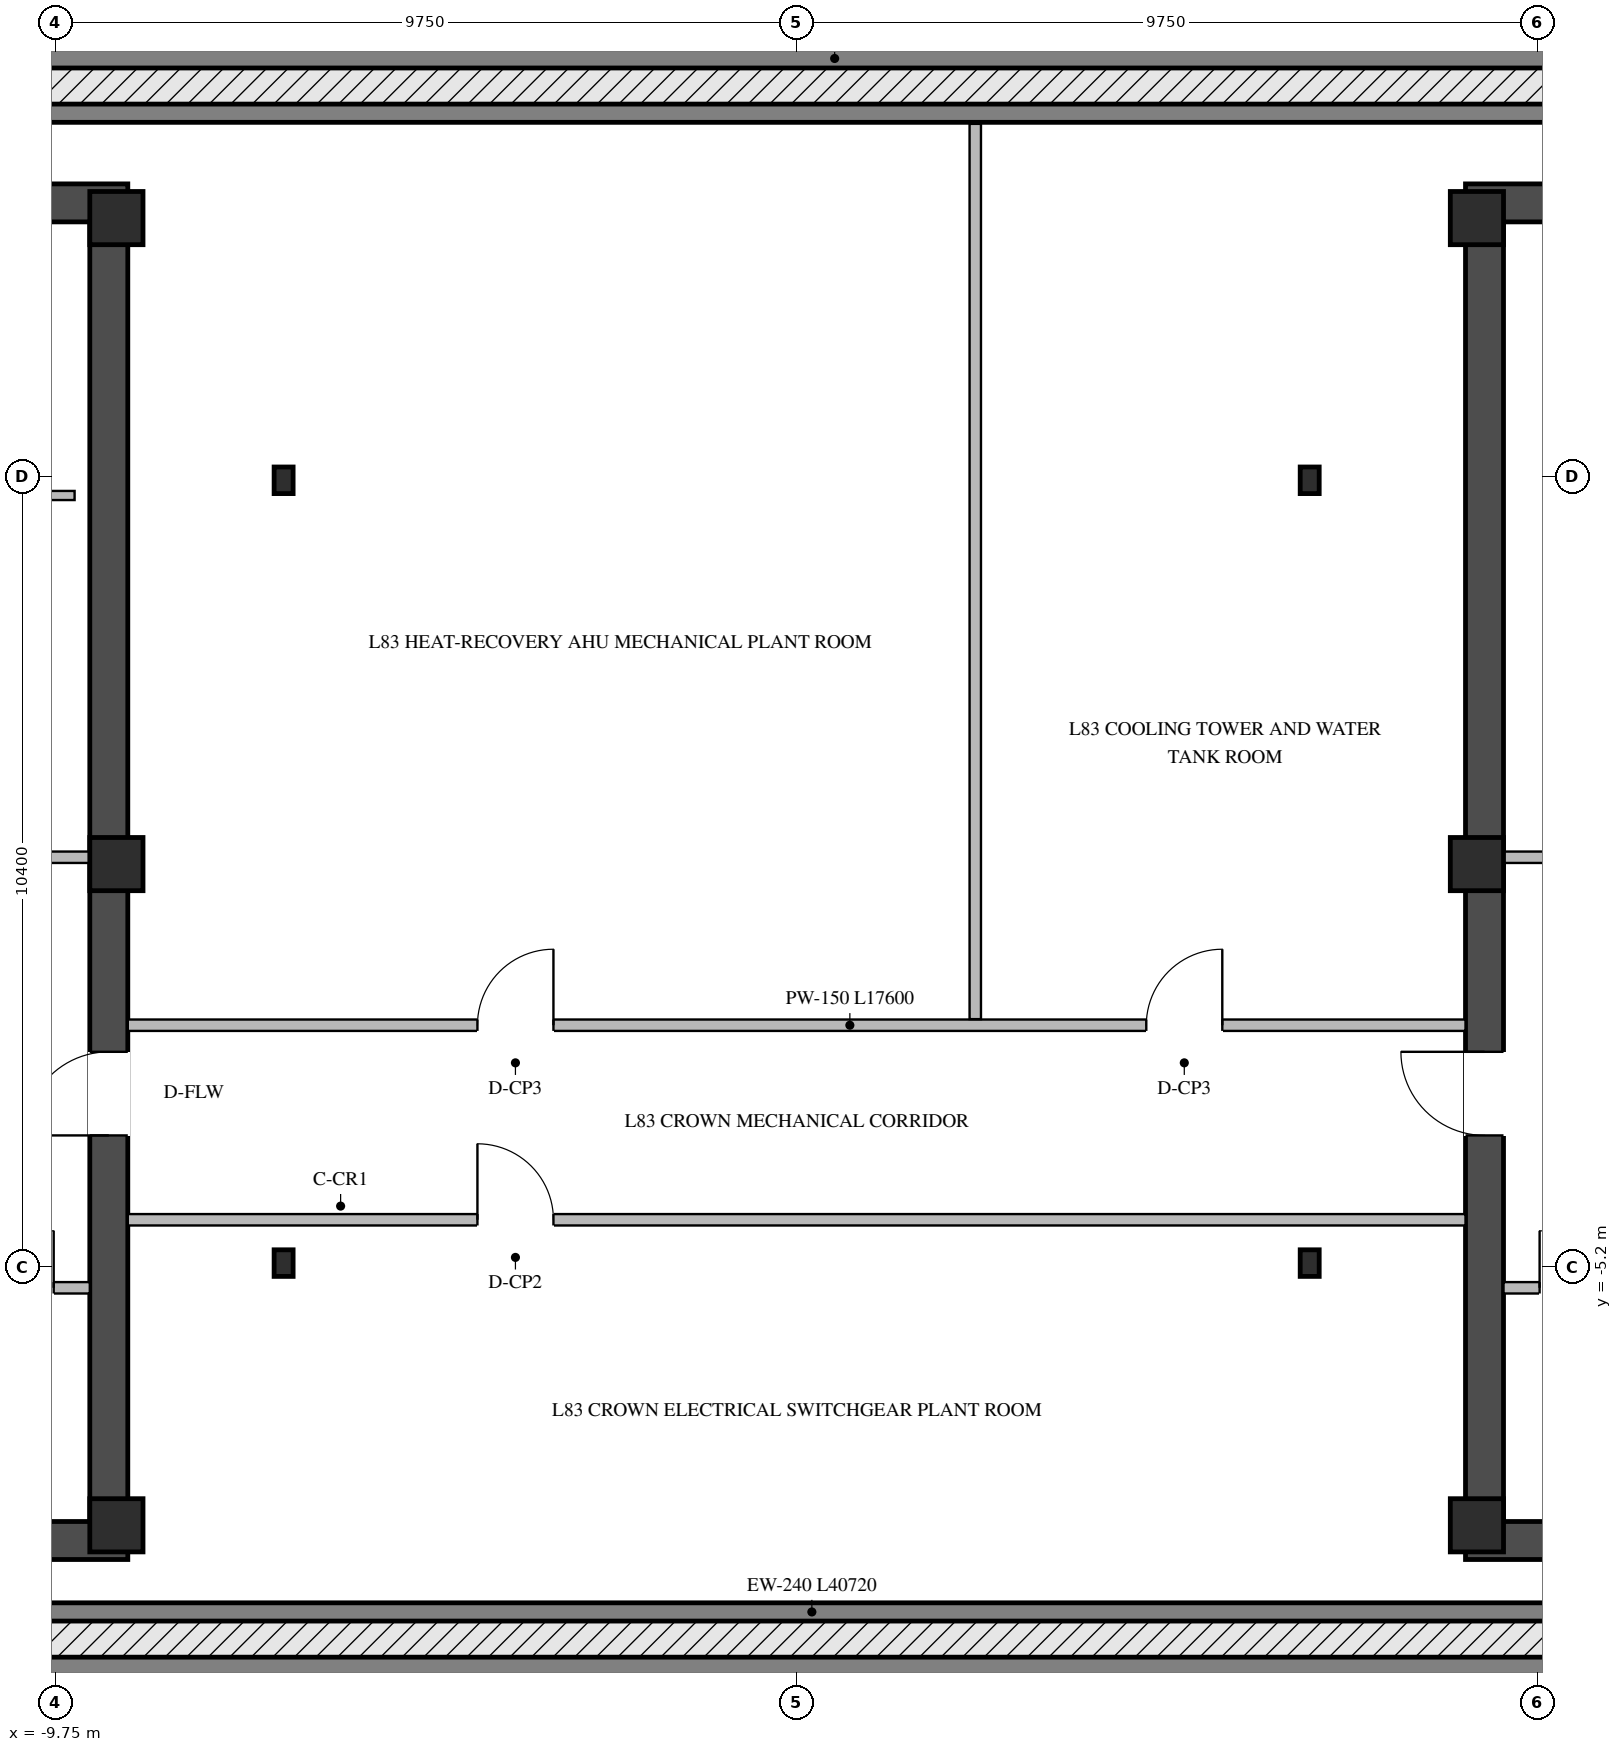
"""IFC4 building model, lengths in metres.
Left out: names, types, materials, properties, quantities, classifications, styles, units other than length and angle.
Written with IfcOpenShell. Run it as: python <this file> out.ifc"""

import sys

from ifc_helpers import new_model, si_unit, direction, frame, frame_2d, origin, origin_2d, place, context, subcontext, project, spatial, rectangle, i_section, extrude, element, fill, save


model = new_model("IFC4")
c1 = context("Model", 3, precision=1e-05, world=origin(), true_north=direction((0.0, 1.0)))
c2 = subcontext(c1, "Body", "Model", "MODEL_VIEW")
j1 = project(units=[si_unit("LENGTHUNIT", "METRE"), si_unit("PLANEANGLEUNIT", "RADIAN")], contexts=[c1])
p1 = place(None, origin())
s1 = spatial("IfcSite", under=j1, at=p1, CompositionType="ELEMENT")
p2 = place(p1, origin())
s2 = spatial("IfcBuilding", under=s1, at=p2, CompositionType="ELEMENT")
p3 = place(p2, frame((0.0, 0.0, 304.95)))
s3 = spatial("IfcBuildingStorey", under=s2, at=p3, CompositionType="ELEMENT", Elevation=304.95)
for number, where, z_axis, x_axis in (
    (1, (-19.05, -8.8, 0.0), (0.0, 0.0, 1.0), (1.0, 0.0, 0.0)),
    (2, (-19.05, 8.8, 0.0), (0.0, 0.0, 1.0), (1.0, 0.0, 0.0)),
):
    element("IfcWall", number, at=place(p3, frame(where, z_axis=z_axis, x_axis=x_axis)), inside=s3, PredefinedType="SHEAR", context=c2, shape_type="SweptSolid", body=[
        extrude(rectangle(XDim=10.25, YDim=0.5, at=frame_2d((5.125, 0.0))), origin(), (0.0, 0.0, 1.0), 3.35),
    ])
p4 = place(p3, frame((-9.05, -8.55, 0.0), z_axis=(0.0, 0.0, 1.0), x_axis=(0.0, 1.0, 0.0)))
e3 = element("IfcWall", 3, at=p4, inside=s3, PredefinedType="SHEAR", context=c2, shape_type="SweptSolid", body=[
    extrude(rectangle(XDim=17.1, YDim=0.5, at=frame_2d((8.55, 0.0))), origin(), (0.0, 0.0, 1.0), 3.35),
])
p5 = place(p4, frame((5.08, 0.0, 0.0)))
e4 = element("IfcOpeningElement", 4, at=p5, cuts=e3, PredefinedType="OPENING", context=c2, shape_type="SweptSolid", body=[
    extrude(rectangle(XDim=1.1, YDim=2.08, at=frame_2d((0.55, 1.04))), frame((0.0, 0.26, 0.0), z_axis=(0.0, -1.0, 0.0), x_axis=(1.0, 0.0, 0.0)), (0.0, 0.0, 1.0), 0.52),
])
for number, where, z_axis, x_axis in (
    (5, (8.8, -8.8, 0.0), (0.0, 0.0, 1.0), (1.0, 0.0, 0.0)),
    (6, (8.8, 8.8, 0.0), (0.0, 0.0, 1.0), (1.0, 0.0, 0.0)),
):
    element("IfcWall", number, at=place(p3, frame(where, z_axis=z_axis, x_axis=x_axis)), inside=s3, PredefinedType="SHEAR", context=c2, shape_type="SweptSolid", body=[
        extrude(rectangle(XDim=10.25, YDim=0.5, at=frame_2d((5.125, 0.0))), origin(), (0.0, 0.0, 1.0), 3.35),
    ])
p6 = place(p3, frame((9.05, -8.55, 0.0), z_axis=(0.0, 0.0, 1.0), x_axis=(0.0, 1.0, 0.0)))
e7 = element("IfcWall", 7, at=p6, inside=s3, PredefinedType="SHEAR", context=c2, shape_type="SweptSolid", body=[
    extrude(rectangle(XDim=17.1, YDim=0.5, at=frame_2d((8.55, 0.0))), origin(), (0.0, 0.0, 1.0), 3.35),
])
p7 = place(p6, frame((5.08, 0.0, 0.0)))
e8 = element("IfcOpeningElement", 8, at=p7, cuts=e7, PredefinedType="OPENING", context=c2, shape_type="SweptSolid", body=[
    extrude(rectangle(XDim=1.1, YDim=2.08, at=frame_2d((0.55, 1.04))), frame((0.0, 0.26, 0.0), z_axis=(0.0, -1.0, 0.0), x_axis=(1.0, 0.0, 0.0)), (0.0, 0.0, 1.0), 0.52),
])
for number, where, z_axis, x_axis in (
    (9, (-8.95, -8.6, 0.0), (0.0, 0.0, 1.0), (1.0, 0.0, 0.0)),
    (10, (-8.95, 0.1, 0.0), (0.0, 0.0, 1.0), (1.0, 0.0, 0.0)),
    (11, (-8.95, 8.6, 0.0), (0.0, 0.0, 1.0), (1.0, 0.0, 0.0)),
    (12, (8.95, -8.6, 0.0), (0.0, 0.0, 1.0), (1.0, 0.0, 0.0)),
    (13, (8.95, 0.1, 0.0), (0.0, 0.0, 1.0), (1.0, 0.0, 0.0)),
    (14, (8.95, 8.6, 0.0), (0.0, 0.0, 1.0), (1.0, 0.0, 0.0)),
):
    element("IfcColumn", number, at=place(p3, frame(where, z_axis=z_axis, x_axis=x_axis)), inside=s3, PredefinedType="COLUMN", context=c2, shape_type="SweptSolid", body=[
        extrude(rectangle(XDim=0.7, YDim=0.7, at=origin_2d()), origin(), (0.0, 0.0, 1.0), 3.6),
    ])
for number, where, z_axis, x_axis in (
    (15, (-6.75, -5.15, 0.0), (0.0, 0.0, 1.0), (1.0, 0.0, 0.0)),
    (16, (-6.75, 5.15, 0.0), (0.0, 0.0, 1.0), (1.0, 0.0, 0.0)),
    (17, (6.75, -5.15, 0.0), (0.0, 0.0, 1.0), (1.0, 0.0, 0.0)),
    (18, (6.75, 5.15, 0.0), (0.0, 0.0, 1.0), (1.0, 0.0, 0.0)),
):
    element("IfcColumn", number, at=place(p3, frame(where, z_axis=z_axis, x_axis=x_axis)), inside=s3, PredefinedType="COLUMN", context=c2, shape_type="SweptSolid", body=[
        extrude(i_section(OverallWidth=0.25, OverallDepth=0.35, WebThickness=0.01, FlangeThickness=0.012, at=origin_2d()), origin(), (0.0, 0.0, 1.0), 3.6),
    ])
for number, where, z_axis, x_axis in (
    (19, (-20.16, -9.74, 0.0), (0.0, 0.0, 1.0), (1.0, 0.0, 0.0)),
    (20, (20.56, 9.98, 0.0), (0.0, 0.0, 1.0), (-1.0, 0.0, 0.0)),
):
    element("IfcWall", number, at=place(p3, frame(where, z_axis=z_axis, x_axis=x_axis)), inside=s3, PredefinedType="STANDARD", context=c2, shape_type="SweptSolid", body=[
        extrude(rectangle(XDim=40.72, YDim=0.24, at=frame_2d((20.36, 0.0))), origin(), (0.0, 0.0, 1.0), 3.33),
    ])
for number, where, z_axis, x_axis in (
    (21, (-20.05, 10.7, 0.0), (0.0, 0.0, 1.0), (1.0, 0.0, 0.0)),
    (22, (21.05, -10.46, 0.0), (0.0, 0.0, 1.0), (-1.0, 0.0, 0.0)),
):
    element("IfcWall", number, at=place(p3, frame(where, z_axis=z_axis, x_axis=x_axis)), inside=s3, PredefinedType="PARAPET", context=c2, shape_type="SweptSolid", body=[
        extrude(rectangle(XDim=41.1, YDim=0.25, at=frame_2d((20.55, 0.0))), origin(), (0.0, 0.0, 1.0), 1.2),
    ])
p8 = place(p3, frame((-12.895, -5.475, 0.0), z_axis=(0.0, 0.0, 1.0), x_axis=(1.0, 0.0, 0.0)))
e23 = element("IfcWall", 23, at=p8, inside=s3, PredefinedType="STANDARD", context=c2, shape_type="SweptSolid", body=[
    extrude(rectangle(XDim=3.595, YDim=0.15, at=frame_2d((1.797, 0.0))), origin(), (0.0, 0.0, 1.0), 3.33),
])
p9 = place(p8, frame((0.42, 0.0, 0.0)))
e24 = element("IfcOpeningElement", 24, at=p9, cuts=e23, PredefinedType="OPENING", context=c2, shape_type="SweptSolid", body=[
    extrude(rectangle(XDim=1.1, YDim=2.15, at=frame_2d((0.55, 1.075))), frame((0.0, 0.085, 0.0), z_axis=(0.0, -1.0, 0.0), x_axis=(1.0, 0.0, 0.0)), (0.0, 0.0, 1.0), 0.17),
])
p10 = place(p8, frame((2.37, 0.0, 0.0)))
e25 = element("IfcOpeningElement", 25, at=p10, cuts=e23, PredefinedType="OPENING", context=c2, shape_type="SweptSolid", body=[
    extrude(rectangle(XDim=0.75, YDim=2.05, at=frame_2d((0.375, 1.025))), frame((0.0, 0.085, 0.0), z_axis=(0.0, -1.0, 0.0), x_axis=(1.0, 0.0, 0.0)), (0.0, 0.0, 1.0), 0.17),
])
p11 = place(p3, frame((-12.89, 0.19, 0.0), z_axis=(0.0, 0.0, 1.0), x_axis=(1.0, 0.0, 0.0)))
e26 = element("IfcWall", 26, at=p11, inside=s3, PredefinedType="STANDARD", context=c2, shape_type="SweptSolid", body=[
    extrude(rectangle(XDim=3.59, YDim=0.15, at=frame_2d((1.795, 0.0))), origin(), (0.0, 0.0, 1.0), 2.825),
])
p12 = place(p11, frame((0.415, 0.0, 0.0)))
e27 = element("IfcOpeningElement", 27, at=p12, cuts=e26, PredefinedType="OPENING", context=c2, shape_type="SweptSolid", body=[
    extrude(rectangle(XDim=0.85, YDim=2.04, at=frame_2d((0.425, 1.02))), frame((0.0, 0.085, 0.0), z_axis=(0.0, -1.0, 0.0), x_axis=(1.0, 0.0, 0.0)), (0.0, 0.0, 1.0), 0.17),
])
p13 = place(p3, frame((-11.05, 4.95, 0.0), z_axis=(0.0, 0.0, 1.0), x_axis=(1.0, 0.0, 0.0)))
e28 = element("IfcWall", 28, at=p13, inside=s3, PredefinedType="STANDARD", context=c2, shape_type="SweptSolid", body=[
    extrude(rectangle(XDim=1.55, YDim=0.12, at=frame_2d((0.775, 0.0))), origin(), (0.0, 0.0, 1.0), 3.33),
])
p14 = place(p3, frame((9.3, -5.475, 0.0), z_axis=(0.0, 0.0, 1.0), x_axis=(1.0, 0.0, 0.0)))
e29 = element("IfcWall", 29, at=p14, inside=s3, PredefinedType="STANDARD", context=c2, shape_type="SweptSolid", body=[
    extrude(rectangle(XDim=3.595, YDim=0.15, at=frame_2d((1.797, 0.0))), origin(), (0.0, 0.0, 1.0), 3.33),
])
p15 = place(p14, frame((2.075, 0.0, 0.0)))
e30 = element("IfcOpeningElement", 30, at=p15, cuts=e29, PredefinedType="OPENING", context=c2, shape_type="SweptSolid", body=[
    extrude(rectangle(XDim=1.1, YDim=2.15, at=frame_2d((0.55, 1.075))), frame((0.0, 0.085, 0.0), z_axis=(0.0, -1.0, 0.0), x_axis=(1.0, 0.0, 0.0)), (0.0, 0.0, 1.0), 0.17),
])
p16 = place(p14, frame((0.475, 0.0, 0.0)))
e31 = element("IfcOpeningElement", 31, at=p16, cuts=e29, PredefinedType="OPENING", context=c2, shape_type="SweptSolid", body=[
    extrude(rectangle(XDim=0.75, YDim=2.05, at=frame_2d((0.375, 1.025))), frame((0.0, 0.085, 0.0), z_axis=(0.0, -1.0, 0.0), x_axis=(1.0, 0.0, 0.0)), (0.0, 0.0, 1.0), 0.17),
])
p17 = place(p3, frame((9.3, 0.19, 0.0), z_axis=(0.0, 0.0, 1.0), x_axis=(1.0, 0.0, 0.0)))
e32 = element("IfcWall", 32, at=p17, inside=s3, PredefinedType="STANDARD", context=c2, shape_type="SweptSolid", body=[
    extrude(rectangle(XDim=3.59, YDim=0.15, at=frame_2d((1.795, 0.0))), origin(), (0.0, 0.0, 1.0), 2.825),
])
p18 = place(p17, frame((2.325, 0.0, 0.0)))
e33 = element("IfcOpeningElement", 33, at=p18, cuts=e32, PredefinedType="OPENING", context=c2, shape_type="SweptSolid", body=[
    extrude(rectangle(XDim=0.85, YDim=2.04, at=frame_2d((0.425, 1.02))), frame((0.0, 0.085, 0.0), z_axis=(0.0, -1.0, 0.0), x_axis=(1.0, 0.0, 0.0)), (0.0, 0.0, 1.0), 0.17),
])
p19 = place(p3, frame((-8.8, -2.02, 0.0), z_axis=(0.0, 0.0, 1.0), x_axis=(1.0, 0.0, 0.0)))
e34 = element("IfcWall", 34, at=p19, inside=s3, PredefinedType="STANDARD", context=c2, shape_type="SweptSolid", body=[
    extrude(rectangle(XDim=17.6, YDim=0.15, at=frame_2d((8.8, 0.0))), origin(), (0.0, 0.0, 1.0), 3.33),
])
p20 = place(p19, frame((4.6, 0.0, 0.0)))
e35 = element("IfcOpeningElement", 35, at=p20, cuts=e34, PredefinedType="OPENING", context=c2, shape_type="SweptSolid", body=[
    extrude(rectangle(XDim=1.0, YDim=2.02, at=frame_2d((0.5, 1.01))), frame((0.0, 0.085, 0.0), z_axis=(0.0, -1.0, 0.0), x_axis=(1.0, 0.0, 0.0)), (0.0, 0.0, 1.0), 0.17),
])
p21 = place(p19, frame((13.4, 0.0, 0.0)))
e36 = element("IfcOpeningElement", 36, at=p21, cuts=e34, PredefinedType="OPENING", context=c2, shape_type="SweptSolid", body=[
    extrude(rectangle(XDim=1.0, YDim=2.02, at=frame_2d((0.5, 1.01))), frame((0.0, 0.085, 0.0), z_axis=(0.0, -1.0, 0.0), x_axis=(1.0, 0.0, 0.0)), (0.0, 0.0, 1.0), 0.17),
])
p22 = place(p3, frame((2.35, -1.94, 0.0), z_axis=(0.0, 0.0, 1.0), x_axis=(0.0, 1.0, 0.0)))
e37 = element("IfcWall", 37, at=p22, inside=s3, PredefinedType="STANDARD", context=c2, shape_type="SweptSolid", body=[
    extrude(rectangle(XDim=11.78, YDim=0.15, at=frame_2d((5.89, 0.0))), origin(), (0.0, 0.0, 1.0), 3.33),
])
p23 = place(p3, frame((-8.8, -4.58, 0.0), z_axis=(0.0, 0.0, 1.0), x_axis=(1.0, 0.0, 0.0)))
e38 = element("IfcWall", 38, at=p23, inside=s3, PredefinedType="STANDARD", context=c2, shape_type="SweptSolid", body=[
    extrude(rectangle(XDim=17.6, YDim=0.15, at=frame_2d((8.8, 0.0))), origin(), (0.0, 0.0, 1.0), 3.33),
])
p24 = place(p23, frame((4.6, 0.0, 0.0)))
e39 = element("IfcOpeningElement", 39, at=p24, cuts=e38, PredefinedType="OPENING", context=c2, shape_type="SweptSolid", body=[
    extrude(rectangle(XDim=1.0, YDim=2.02, at=frame_2d((0.5, 1.01))), frame((0.0, 0.085, 0.0), z_axis=(0.0, -1.0, 0.0), x_axis=(1.0, 0.0, 0.0)), (0.0, 0.0, 1.0), 0.17),
])
p25 = place(p10, origin())
e40 = element("IfcDoor", 40, at=p25, inside=s3, OperationType="SINGLE_SWING_RIGHT", PredefinedType="DOOR", context=c2, shape_type="SweptSolid", body=[
    extrude(rectangle(XDim=0.75, YDim=2.05, at=frame_2d((0.375, 1.025))), frame((0.0, 0.025, 0.0), z_axis=(0.0, -1.0, 0.0), x_axis=(1.0, 0.0, 0.0)), (0.0, 0.0, 1.0), 0.05),
])
fill(e25, e40)
p26 = place(p5, origin())
e41 = element("IfcDoor", 41, at=p26, inside=s3, OperationType="SINGLE_SWING_LEFT", PredefinedType="DOOR", context=c2, shape_type="SweptSolid", body=[
    extrude(rectangle(XDim=1.1, YDim=2.08, at=frame_2d((0.55, 1.04))), frame((0.0, 0.205, 0.0), z_axis=(0.0, -1.0, 0.0), x_axis=(1.0, 0.0, 0.0)), (0.0, 0.0, 1.0), 0.05),
])
fill(e4, e41)
p27 = place(p16, origin())
e42 = element("IfcDoor", 42, at=p27, inside=s3, OperationType="SINGLE_SWING_LEFT", PredefinedType="DOOR", context=c2, shape_type="SweptSolid", body=[
    extrude(rectangle(XDim=0.75, YDim=2.05, at=frame_2d((0.375, 1.025))), frame((0.0, 0.025, 0.0), z_axis=(0.0, -1.0, 0.0), x_axis=(1.0, 0.0, 0.0)), (0.0, 0.0, 1.0), 0.05),
])
fill(e31, e42)
p28 = place(p7, origin())
e43 = element("IfcDoor", 43, at=p28, inside=s3, OperationType="SINGLE_SWING_RIGHT", PredefinedType="DOOR", context=c2, shape_type="SweptSolid", body=[
    extrude(rectangle(XDim=1.1, YDim=2.08, at=frame_2d((0.55, 1.04))), frame((0.0, -0.155, 0.0), z_axis=(0.0, -1.0, 0.0), x_axis=(1.0, 0.0, 0.0)), (0.0, 0.0, 1.0), 0.05),
])
fill(e8, e43)
p29 = place(p20, origin())
e44 = element("IfcDoor", 44, at=p29, inside=s3, OperationType="SINGLE_SWING_RIGHT", PredefinedType="DOOR", context=c2, shape_type="SweptSolid", body=[
    extrude(rectangle(XDim=1.0, YDim=2.02, at=frame_2d((0.5, 1.01))), frame((0.0, 0.025, 0.0), z_axis=(0.0, -1.0, 0.0), x_axis=(1.0, 0.0, 0.0)), (0.0, 0.0, 1.0), 0.05),
])
fill(e35, e44)
p30 = place(p21, origin())
e45 = element("IfcDoor", 45, at=p30, inside=s3, OperationType="SINGLE_SWING_RIGHT", PredefinedType="DOOR", context=c2, shape_type="SweptSolid", body=[
    extrude(rectangle(XDim=1.0, YDim=2.02, at=frame_2d((0.5, 1.01))), frame((0.0, 0.025, 0.0), z_axis=(0.0, -1.0, 0.0), x_axis=(1.0, 0.0, 0.0)), (0.0, 0.0, 1.0), 0.05),
])
fill(e36, e45)
p31 = place(p24, origin())
e46 = element("IfcDoor", 46, at=p31, inside=s3, OperationType="SINGLE_SWING_LEFT", PredefinedType="DOOR", context=c2, shape_type="SweptSolid", body=[
    extrude(rectangle(XDim=1.0, YDim=2.02, at=frame_2d((0.5, 1.01))), frame((0.0, 0.025, 0.0), z_axis=(0.0, -1.0, 0.0), x_axis=(1.0, 0.0, 0.0)), (0.0, 0.0, 1.0), 0.05),
])
fill(e39, e46)
save(model, sys.argv[1])
